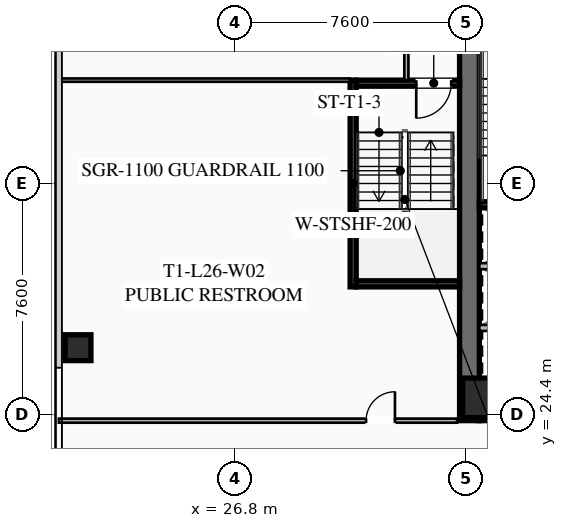
"""IFC4 building model, lengths in metres.
Left out: names, types, materials, properties, quantities, classifications, styles, units other than length and angle.
Written with IfcOpenShell. Run it as: python <this file> out.ifc"""

import sys

from ifc_helpers import new_model, si_unit, direction, frame, frame_2d, origin, origin_2d, place, context, subcontext, project, spatial, rectangle, hollow_rectangle, extrude, element, fill, save


model = new_model("IFC4")
c1 = context("Model", 3, precision=1e-05, world=origin(), true_north=direction((0.0, 1.0)))
c2 = subcontext(c1, "Body", "Model", "MODEL_VIEW")
j1 = project(units=[si_unit("LENGTHUNIT", "METRE"), si_unit("PLANEANGLEUNIT", "RADIAN")], contexts=[c1])
p1 = place(None, origin())
s1 = spatial("IfcSite", under=j1, at=p1, CompositionType="ELEMENT")
p2 = place(p1, origin())
s2 = spatial("IfcBuilding", under=s1, at=p2, CompositionType="ELEMENT")
p3 = place(p2, frame((0.0, 0.0, 99.15)))
s3 = spatial("IfcBuildingStorey", under=s2, at=p3, CompositionType="ELEMENT", Elevation=99.15)
p4 = place(p3, frame((34.525, 24.2, 0.0), z_axis=(0.0, 0.0, 1.0), x_axis=(0.0, 1.0, 0.0)))
e1 = element("IfcWall", 1, at=p4, inside=s3, PredefinedType="SHEAR", context=c2, shape_type="SweptSolid", body=[
    extrude(rectangle(XDim=15.6, YDim=0.65, at=frame_2d((7.8, 0.0))), origin(), (0.0, 0.0, 1.0), 3.55),
])
p5 = place(p3, frame((49.15, 24.525, 0.0), z_axis=(0.0, 0.0, 1.0), x_axis=(-1.0, 0.0, 0.0)))
e2 = element("IfcWall", 2, at=p5, inside=s3, PredefinedType="SHEAR", context=c2, shape_type="SweptSolid", body=[
    extrude(rectangle(XDim=14.3, YDim=0.65, at=frame_2d((7.15, 0.0))), origin(), (0.0, 0.0, 1.0), 3.55),
])
p6 = place(p5, frame((8.85, 0.0, 0.0)))
e3 = element("IfcOpeningElement", 3, at=p6, cuts=e2, PredefinedType="OPENING", context=c2, shape_type="SweptSolid", body=[
    extrude(rectangle(XDim=1.25, YDim=2.25, at=frame_2d((0.625, 1.125))), frame((0.0, 0.335, 0.0), z_axis=(0.0, -1.0, 0.0), x_axis=(1.0, 0.0, 0.0)), (0.0, 0.0, 1.0), 0.67),
])
p7 = place(p5, frame((3.8, 0.0, 0.0)))
e4 = element("IfcOpeningElement", 4, at=p7, cuts=e2, PredefinedType="OPENING", context=c2, shape_type="SweptSolid", body=[
    extrude(rectangle(XDim=1.25, YDim=2.25, at=frame_2d((0.625, 1.125))), frame((0.0, 0.335, 0.0), z_axis=(0.0, -1.0, 0.0), x_axis=(1.0, 0.0, 0.0)), (0.0, 0.0, 1.0), 0.67),
])
p8 = place(p3, frame((34.95, 24.95, 0.0), z_axis=(0.0, 0.0, 1.0), x_axis=(1.0, 0.0, 0.0)))
e5 = element("IfcColumn", 5, at=p8, inside=s3, PredefinedType="COLUMN", context=c2, shape_type="SweptSolid", body=[
    extrude(hollow_rectangle(XDim=1.3, YDim=1.3, WallThickness=0.05, at=origin_2d()), origin(), (0.0, 0.0, 1.0), 3.35),
])
p9 = place(p3, frame((21.65, 26.6, 0.0), z_axis=(0.0, 0.0, 1.0), x_axis=(1.0, 0.0, 0.0)))
e6 = element("IfcColumn", 6, at=p9, inside=s3, PredefinedType="COLUMN", context=c2, shape_type="SweptSolid", body=[
    extrude(hollow_rectangle(XDim=0.85, YDim=0.85, WallThickness=0.035, at=origin_2d()), origin(), (0.0, 0.0, 1.0), 3.35),
])
p10 = place(p3, frame((34.85, 31.3, 0.0), z_axis=(0.0, 0.0, 1.0), x_axis=(1.0, 0.0, 0.0)))
e7 = element("IfcWall", 7, at=p10, inside=s3, PredefinedType="SHEAR", context=c2, shape_type="SweptSolid", body=[
    extrude(rectangle(XDim=3.45, YDim=0.2, at=frame_2d((1.725, 0.0))), origin(), (0.0, 0.0, 1.0), 3.35),
])
for number, where, z_axis, x_axis in (
    (8, (34.85, 27.25, 0.0), (0.0, 0.0, 1.0), (1.0, 0.0, 0.0)),
    (9, (34.85, 29.28, 0.0), (0.0, 0.0, 1.0), (1.0, 0.0, 0.0)),
):
    element("IfcWall", number, at=place(p3, frame(where, z_axis=z_axis, x_axis=x_axis)), inside=s3, PredefinedType="SOLIDWALL", context=c2, shape_type="SweptSolid", body=[
        extrude(rectangle(XDim=3.1, YDim=0.2, at=frame_2d((1.55, 0.0))), origin(), (0.0, 0.0, 1.0), 3.35),
    ])
p11 = place(p3, frame((30.7, 28.6, 0.0), z_axis=(0.0, 0.0, 1.0), x_axis=(0.0, 1.0, 0.0)))
e10 = element("IfcWall", 10, at=p11, inside=s3, PredefinedType="SHEAR", context=c2, shape_type="SweptSolid", body=[
    extrude(rectangle(XDim=6.8, YDim=0.2, at=frame_2d((3.4, 0.0))), origin(), (0.0, 0.0, 1.0), 3.35),
])
p12 = place(p3, frame((34.2, 35.3, 0.0), z_axis=(0.0, 0.0, 1.0), x_axis=(-1.0, 0.0, 0.0)))
e11 = element("IfcWall", 11, at=p12, inside=s3, PredefinedType="SHEAR", context=c2, shape_type="SweptSolid", body=[
    extrude(rectangle(XDim=3.4, YDim=0.2, at=frame_2d((1.7, 0.0))), origin(), (0.0, 0.0, 1.0), 3.35),
])
p13 = place(p12, frame((0.275, 0.0, 0.0)))
e12 = element("IfcOpeningElement", 12, at=p13, cuts=e11, PredefinedType="OPENING", context=c2, shape_type="SweptSolid", body=[
    extrude(rectangle(XDim=1.15, YDim=2.2, at=frame_2d((0.575, 1.1))), frame((0.0, 0.11, 0.0), z_axis=(0.0, -1.0, 0.0), x_axis=(1.0, 0.0, 0.0)), (0.0, 0.0, 1.0), 0.22),
])
p14 = place(p3, frame((30.8, 28.7, 0.0), z_axis=(0.0, 0.0, 1.0), x_axis=(1.0, 0.0, 0.0)))
e13 = element("IfcWall", 13, at=p14, inside=s3, PredefinedType="SHEAR", context=c2, shape_type="SweptSolid", body=[
    extrude(rectangle(XDim=3.4, YDim=0.2, at=frame_2d((1.7, 0.0))), origin(), (0.0, 0.0, 1.0), 3.35),
])
p15 = place(p3, frame((32.45, 35.4, 0.0), z_axis=(0.0, 0.0, 1.0), x_axis=(0.0, 1.0, 0.0)))
e14 = element("IfcWall", 14, at=p15, inside=s3, PredefinedType="PARTITIONING", context=c2, shape_type="SweptSolid", body=[
    extrude(rectangle(XDim=4.4, YDim=0.135, at=frame_2d((2.2, 0.0))), origin(), (0.0, 0.0, 1.0), 2.703),
])
p16 = place(p3, frame((21.02, 24.2, 0.0), z_axis=(0.0, 0.0, 1.0), x_axis=(1.0, 0.0, 0.0)))
e15 = element("IfcWall", 15, at=p16, inside=s3, PredefinedType="PARTITIONING", context=c2, shape_type="SweptSolid", body=[
    extrude(rectangle(XDim=13.1, YDim=0.135, at=frame_2d((6.55, 0.0))), origin(), (0.0, 0.0, 1.0), 2.703),
])
p17 = place(p16, frame((10.105, 0.0, 0.0)))
e16 = element("IfcOpeningElement", 16, at=p17, cuts=e15, PredefinedType="OPENING", context=c2, shape_type="SweptSolid", body=[
    extrude(rectangle(XDim=0.95, YDim=2.05, at=frame_2d((0.475, 1.025))), frame((0.0, 0.077, 0.0), z_axis=(0.0, -1.0, 0.0), x_axis=(1.0, 0.0, 0.0)), (0.0, 0.0, 1.0), 0.155),
])
p18 = place(p3, frame((30.6, 35.4, 0.0), z_axis=(0.0, 0.0, 1.0), x_axis=(-1.0, 0.0, 0.0)))
e17 = element("IfcWall", 17, at=p18, inside=s3, PredefinedType="PARTITIONING", context=c2, shape_type="SweptSolid", body=[
    extrude(rectangle(XDim=9.58, YDim=0.11, at=frame_2d((4.79, 0.0))), origin(), (0.0, 0.0, 1.0), 2.703),
])
p19 = place(p13, origin())
e18 = element("IfcDoor", 18, at=p19, inside=s3, OperationType="SINGLE_SWING_RIGHT", PredefinedType="DOOR", context=c2, shape_type="SweptSolid", body=[
    extrude(rectangle(XDim=1.15, YDim=2.2, at=frame_2d((0.575, 1.1))), frame((0.0, 0.025, 0.0), z_axis=(0.0, -1.0, 0.0), x_axis=(1.0, 0.0, 0.0)), (0.0, 0.0, 1.0), 0.05),
])
fill(e12, e18)
p20 = place(p17, origin())
e19 = element("IfcDoor", 19, at=p20, inside=s3, OperationType="SINGLE_SWING_RIGHT", PredefinedType="DOOR", context=c2, shape_type="SweptSolid", body=[
    extrude(rectangle(XDim=0.95, YDim=2.05, at=frame_2d((0.475, 1.025))), frame((0.0, 0.025, 0.0), z_axis=(0.0, -1.0, 0.0), x_axis=(1.0, 0.0, 0.0)), (0.0, 0.0, 1.0), 0.05),
])
fill(e16, e19)
save(model, sys.argv[1])
